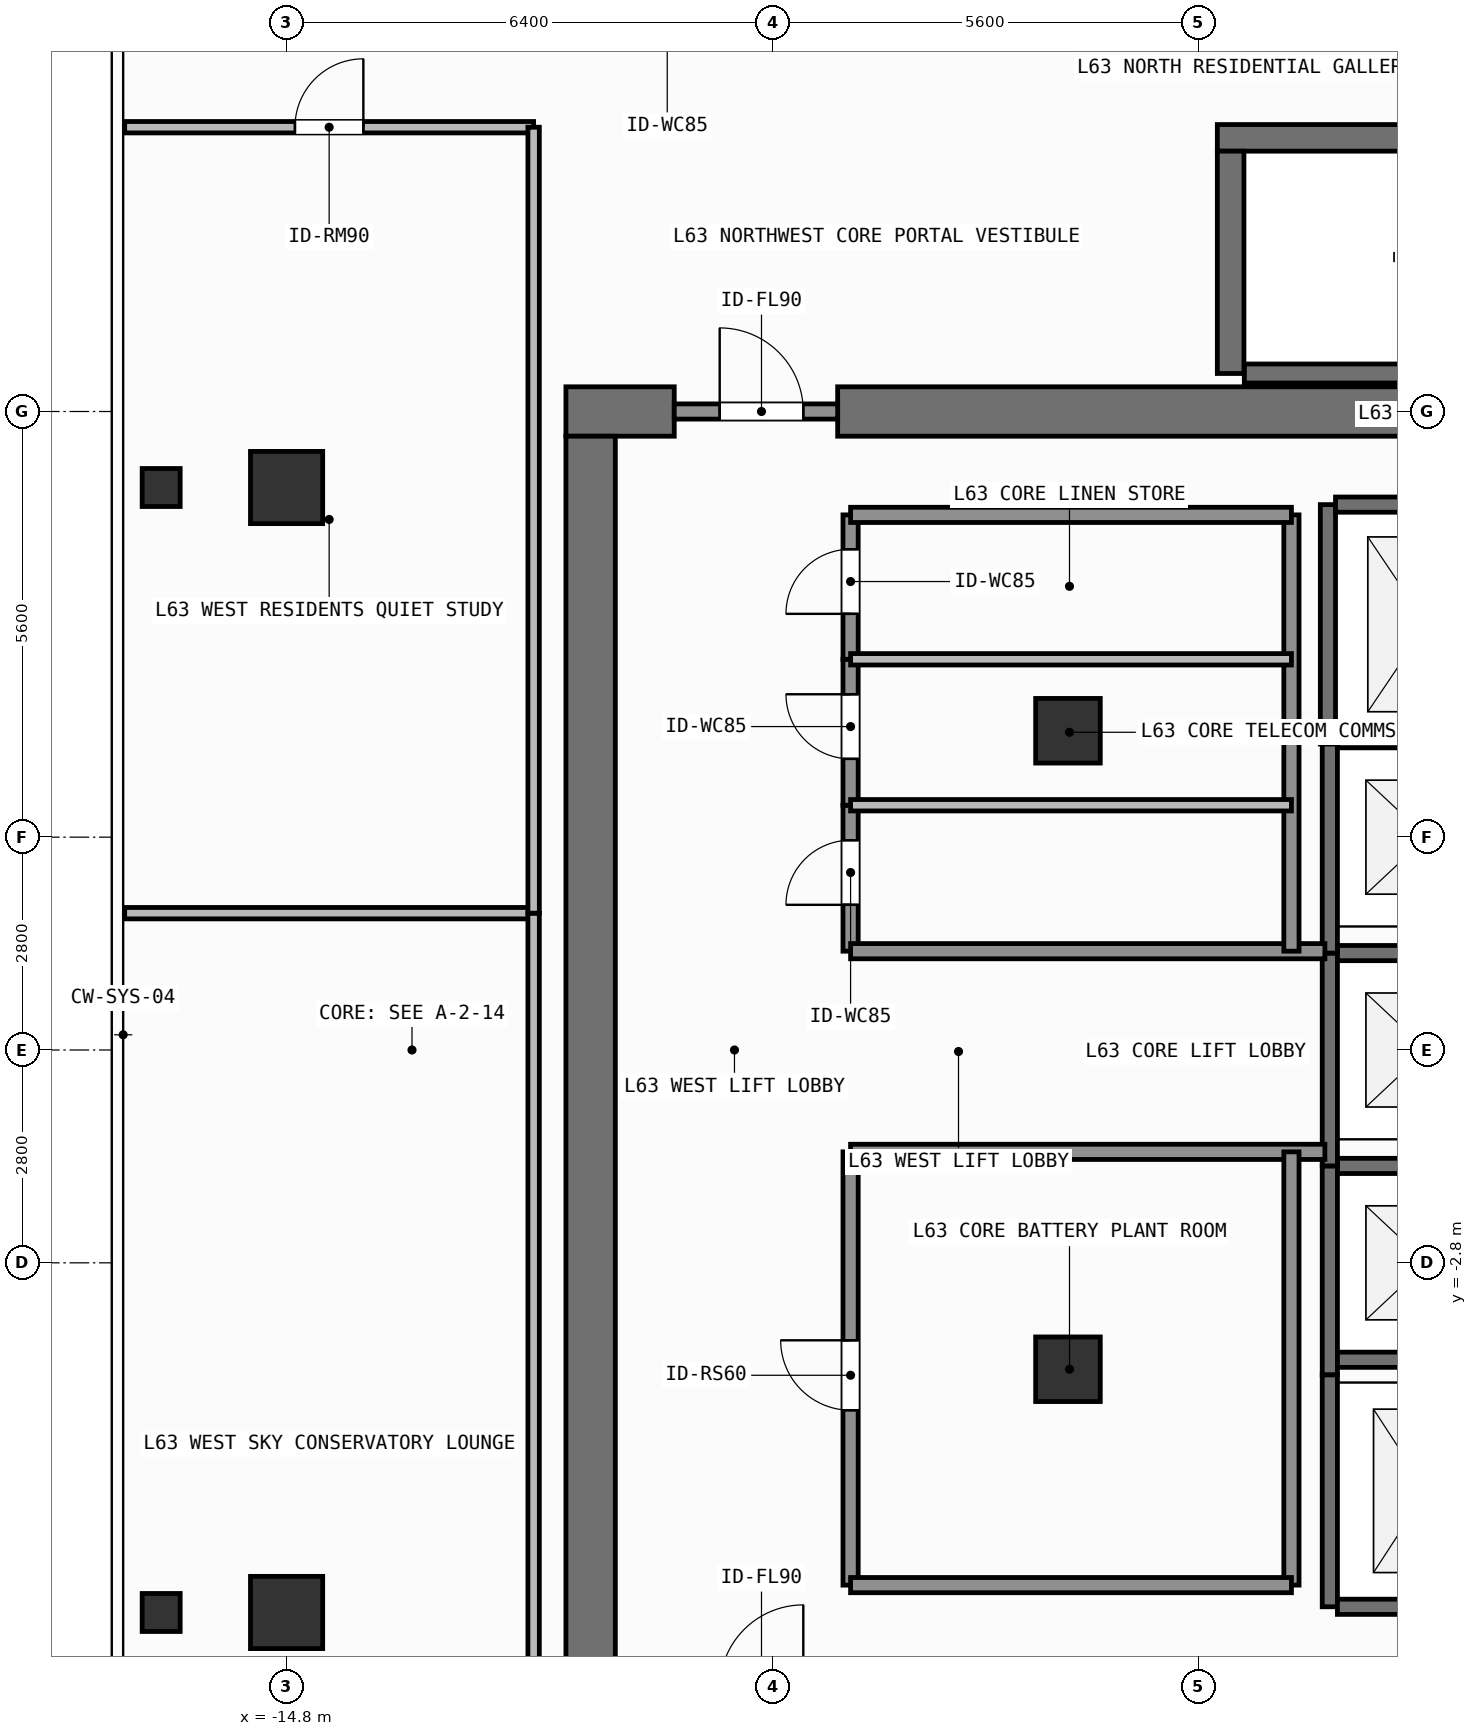
"""IFC4 building model, lengths in metres.
Left out: names, types, materials, properties, quantities, classifications, styles, units other than length and angle.
Written with IfcOpenShell. Run it as: python <this file> out.ifc"""

import sys

from ifc_helpers import new_model, si_unit, direction, frame, frame_2d, origin, origin_2d, place, context, subcontext, project, spatial, rectangle, hollow_rectangle, extrude, element, fill, save


model = new_model("IFC4")
c1 = context("Model", 3, precision=1e-05, world=origin(), true_north=direction((0.0, 1.0)))
c2 = subcontext(c1, "Body", "Model", "MODEL_VIEW")
j1 = project(units=[si_unit("LENGTHUNIT", "METRE"), si_unit("PLANEANGLEUNIT", "RADIAN")], contexts=[c1])
p1 = place(None, origin())
s1 = spatial("IfcSite", under=j1, at=p1, CompositionType="ELEMENT")
p2 = place(p1, origin())
s2 = spatial("IfcBuilding", under=s1, at=p2, CompositionType="ELEMENT")
p3 = place(p2, frame((0.0, 0.0, 258.6)))
s3 = spatial("IfcBuildingStorey", under=s2, at=p3, CompositionType="ELEMENT", Elevation=258.6)
p4 = place(p3, frame((-11.125, 8.4, 0.0), z_axis=(0.0, 0.0, 1.0), x_axis=(1.0, 0.0, 0.0)))
e1 = element("IfcWall", 1, at=p4, inside=s3, PredefinedType="SHEAR", context=c2, shape_type="SweptSolid", body=[
    extrude(rectangle(XDim=1.425, YDim=0.65, at=frame_2d((0.712, 0.0))), origin(), (0.0, 0.0, 1.0), 3.9),
])
p5 = place(p3, frame((-7.55, 8.4, 0.0), z_axis=(0.0, 0.0, 1.0), x_axis=(1.0, 0.0, 0.0)))
e2 = element("IfcWall", 2, at=p5, inside=s3, PredefinedType="SHEAR", context=c2, shape_type="SweptSolid", body=[
    extrude(rectangle(XDim=16.275, YDim=0.65, at=frame_2d((8.138, 0.0))), origin(), (0.0, 0.0, 1.0), 3.9),
])
p6 = place(p3, frame((-10.8, -8.075, 0.0), z_axis=(0.0, 0.0, 1.0), x_axis=(0.0, 1.0, 0.0)))
e3 = element("IfcWall", 3, at=p6, inside=s3, PredefinedType="SHEAR", context=c2, shape_type="SweptSolid", body=[
    extrude(rectangle(XDim=16.15, YDim=0.65, at=frame_2d((8.075, 0.0))), origin(), (0.0, 0.0, 1.0), 3.9),
])
p7 = place(p3, frame((-2.555, 12.0, 0.0), z_axis=(0.0, 0.0, 1.0), x_axis=(1.0, 0.0, 0.0)))
e4 = element("IfcWall", 4, at=p7, inside=s3, PredefinedType="SHEAR", context=c2, shape_type="SweptSolid", body=[
    extrude(rectangle(XDim=7.31, YDim=0.35, at=frame_2d((3.655, 0.0))), origin(), (0.0, 0.0, 1.0), 3.9),
])
p8 = place(p3, frame((-2.2, 8.9, 0.0), z_axis=(0.0, 0.0, 1.0), x_axis=(1.0, 0.0, 0.0)))
e5 = element("IfcWall", 5, at=p8, inside=s3, PredefinedType="SHEAR", context=c2, shape_type="SweptSolid", body=[
    extrude(rectangle(XDim=6.6, YDim=0.25, at=frame_2d((3.3, 0.0))), origin(), (0.0, 0.0, 1.0), 3.9),
])
p9 = place(p3, frame((-2.38, 8.9, 0.0), z_axis=(0.0, 0.0, 1.0), x_axis=(0.0, 1.0, 0.0)))
e6 = element("IfcWall", 6, at=p9, inside=s3, PredefinedType="SHEAR", context=c2, shape_type="SweptSolid", body=[
    extrude(rectangle(XDim=2.925, YDim=0.35, at=frame_2d((1.462, 0.0))), origin(), (0.0, 0.0, 1.0), 3.9),
])
for number, where, z_axis, x_axis in (
    (7, (-14.8, -7.4, 0.0), (0.0, 0.0, 1.0), (1.0, 0.0, 0.0)),
    (8, (-14.8, 7.4, 0.0), (0.0, 0.0, 1.0), (1.0, 0.0, 0.0)),
):
    element("IfcColumn", number, at=place(p3, frame(where, z_axis=z_axis, x_axis=x_axis)), inside=s3, PredefinedType="COLUMN", context=c2, shape_type="SweptSolid", body=[
        extrude(rectangle(XDim=0.95, YDim=0.95, at=origin_2d()), origin(), (0.0, 0.0, 1.0), 3.9),
    ])
for number, where, z_axis, x_axis in (
    (9, (-4.52, -4.2, 0.0), (0.0, 0.0, 1.0), (1.0, 0.0, 0.0)),
    (10, (-4.52, 4.2, 0.0), (0.0, 0.0, 1.0), (1.0, 0.0, 0.0)),
):
    element("IfcColumn", number, at=place(p3, frame(where, z_axis=z_axis, x_axis=x_axis)), inside=s3, PredefinedType="COLUMN", context=c2, shape_type="SweptSolid", body=[
        extrude(rectangle(XDim=0.85, YDim=0.85, at=origin_2d()), origin(), (0.0, 0.0, 1.0), 3.9),
    ])
for number, where, z_axis, x_axis in (
    (11, (-16.45, -7.4, 0.0), (0.0, 0.0, 1.0), (1.0, 0.0, 0.0)),
    (12, (-16.45, 7.4, 0.0), (0.0, 0.0, 1.0), (1.0, 0.0, 0.0)),
):
    element("IfcColumn", number, at=place(p3, frame(where, z_axis=z_axis, x_axis=x_axis)), inside=s3, PredefinedType="COLUMN", context=c2, shape_type="SweptSolid", body=[
        extrude(hollow_rectangle(XDim=0.5, YDim=0.5, WallThickness=0.025, at=origin_2d()), origin(), (0.0, 0.0, 1.0), 3.9),
    ])
p10 = place(p3, frame((-1.075, -4.275, 0.0), z_axis=(0.0, 0.0, 1.0), x_axis=(0.0, 1.0, 0.0)))
e13 = element("IfcWall", 13, at=p10, inside=s3, PredefinedType="SHEAR", context=c2, shape_type="SweptSolid", body=[
    extrude(rectangle(XDim=2.75, YDim=0.2, at=frame_2d((1.375, 0.0))), origin(), (0.0, 0.0, 1.0), 3.68),
])
for number, where, z_axis, x_axis in (
    (14, (-0.975, -4.075, 0.0), (0.0, 0.0, 1.0), (1.0, 0.0, 0.0)),
    (15, (-0.975, -1.525, 0.0), (0.0, 0.0, 1.0), (1.0, 0.0, 0.0)),
):
    element("IfcWall", number, at=place(p3, frame(where, z_axis=z_axis, x_axis=x_axis)), inside=s3, PredefinedType="SHEAR", context=c2, shape_type="SweptSolid", body=[
        extrude(rectangle(XDim=2.35, YDim=0.2, at=frame_2d((1.175, 0.0))), origin(), (0.0, 0.0, 1.0), 3.68),
    ])
p11 = place(p3, frame((-1.075, -1.525, 0.0), z_axis=(0.0, 0.0, 1.0), x_axis=(0.0, 1.0, 0.0)))
e16 = element("IfcWall", 16, at=p11, inside=s3, PredefinedType="SHEAR", context=c2, shape_type="SweptSolid", body=[
    extrude(rectangle(XDim=2.8, YDim=0.2, at=frame_2d((1.4, 0.0))), origin(), (0.0, 0.0, 1.0), 3.68),
])
p12 = place(p3, frame((-0.975, 1.275, 0.0), z_axis=(0.0, 0.0, 1.0), x_axis=(1.0, 0.0, 0.0)))
e17 = element("IfcWall", 17, at=p12, inside=s3, PredefinedType="SHEAR", context=c2, shape_type="SweptSolid", body=[
    extrude(rectangle(XDim=2.35, YDim=0.2, at=frame_2d((1.175, 0.0))), origin(), (0.0, 0.0, 1.0), 3.68),
])
p13 = place(p3, frame((-1.075, 1.275, 0.0), z_axis=(0.0, 0.0, 1.0), x_axis=(0.0, 1.0, 0.0)))
e18 = element("IfcWall", 18, at=p13, inside=s3, PredefinedType="SHEAR", context=c2, shape_type="SweptSolid", body=[
    extrude(rectangle(XDim=2.8, YDim=0.2, at=frame_2d((1.4, 0.0))), origin(), (0.0, 0.0, 1.0), 3.68),
])
p14 = place(p3, frame((-0.975, 4.075, 0.0), z_axis=(0.0, 0.0, 1.0), x_axis=(1.0, 0.0, 0.0)))
e19 = element("IfcWall", 19, at=p14, inside=s3, PredefinedType="SHEAR", context=c2, shape_type="SweptSolid", body=[
    extrude(rectangle(XDim=2.35, YDim=0.2, at=frame_2d((1.175, 0.0))), origin(), (0.0, 0.0, 1.0), 3.68),
])
p15 = place(p3, frame((-1.1, 4.025, 0.0), z_axis=(0.0, 0.0, 1.0), x_axis=(0.0, 1.0, 0.0)))
e20 = element("IfcWall", 20, at=p15, inside=s3, PredefinedType="SHEAR", context=c2, shape_type="SweptSolid", body=[
    extrude(rectangle(XDim=3.15, YDim=0.2, at=frame_2d((1.575, 0.0))), origin(), (0.0, 0.0, 1.0), 3.68),
])
p16 = place(p3, frame((-1.0, 7.175, 0.0), z_axis=(0.0, 0.0, 1.0), x_axis=(1.0, 0.0, 0.0)))
e21 = element("IfcWall", 21, at=p16, inside=s3, PredefinedType="SHEAR", context=c2, shape_type="SweptSolid", body=[
    extrude(rectangle(XDim=2.4, YDim=0.2, at=frame_2d((1.2, 0.0))), origin(), (0.0, 0.0, 1.0), 3.68),
])
p17 = place(p3, frame((-1.075, -7.325, 0.0), z_axis=(0.0, 0.0, 1.0), x_axis=(0.0, 1.0, 0.0)))
e22 = element("IfcWall", 22, at=p17, inside=s3, PredefinedType="SHEAR", context=c2, shape_type="SweptSolid", body=[
    extrude(rectangle(XDim=3.05, YDim=0.2, at=frame_2d((1.525, 0.0))), origin(), (0.0, 0.0, 1.0), 3.68),
])
p18 = place(p3, frame((-0.975, -7.325, 0.0), z_axis=(0.0, 0.0, 1.0), x_axis=(1.0, 0.0, 0.0)))
e23 = element("IfcWall", 23, at=p18, inside=s3, PredefinedType="SHEAR", context=c2, shape_type="SweptSolid", body=[
    extrude(rectangle(XDim=2.35, YDim=0.2, at=frame_2d((1.175, 0.0))), origin(), (0.0, 0.0, 1.0), 3.68),
])
p19 = place(p3, frame((-9.7, 8.4, 0.0), z_axis=(0.0, 0.0, 1.0), x_axis=(1.0, 0.0, 0.0)))
e24 = element("IfcWall", 24, at=p19, inside=s3, PredefinedType="SOLIDWALL", context=c2, shape_type="SweptSolid", body=[
    extrude(rectangle(XDim=2.15, YDim=0.2, at=frame_2d((1.075, 0.0))), origin(), (0.0, 0.0, 1.0), 2.92),
])
p20 = place(p19, frame((0.598, 0.0, 0.0)))
e25 = element("IfcOpeningElement", 25, at=p20, cuts=e24, PredefinedType="OPENING", context=c2, shape_type="SweptSolid", body=[
    extrude(rectangle(XDim=1.1, YDim=2.15, at=frame_2d((0.55, 1.075))), frame((0.0, 0.11, 0.0), z_axis=(0.0, -1.0, 0.0), x_axis=(1.0, 0.0, 0.0)), (0.0, 0.0, 1.0), 0.22),
])
p21 = place(p3, frame((-7.38, -7.04, 0.0), z_axis=(0.0, 0.0, 1.0), x_axis=(0.0, 1.0, 0.0)))
e26 = element("IfcWall", 26, at=p21, inside=s3, PredefinedType="SOLIDWALL", context=c2, shape_type="SweptSolid", body=[
    extrude(rectangle(XDim=5.7, YDim=0.2, at=frame_2d((2.85, 0.0))), origin(), (0.0, 0.0, 1.0), 3.68),
])
p22 = place(p21, frame((2.301, 0.0, 0.0)))
e27 = element("IfcOpeningElement", 27, at=p22, cuts=e26, PredefinedType="OPENING", context=c2, shape_type="SweptSolid", body=[
    extrude(rectangle(XDim=0.92, YDim=2.1, at=frame_2d((0.46, 1.05))), frame((0.0, 0.11, 0.0), z_axis=(0.0, -1.0, 0.0), x_axis=(1.0, 0.0, 0.0)), (0.0, 0.0, 1.0), 0.22),
])
p23 = place(p3, frame((-7.38, 1.3, 0.0), z_axis=(0.0, 0.0, 1.0), x_axis=(0.0, 1.0, 0.0)))
e28 = element("IfcWall", 28, at=p23, inside=s3, PredefinedType="SOLIDWALL", context=c2, shape_type="SweptSolid", body=[
    extrude(rectangle(XDim=1.92, YDim=0.2, at=frame_2d((0.96, 0.0))), origin(), (0.0, 0.0, 1.0), 3.68),
])
p24 = place(p23, frame((0.61, 0.0, 0.0)))
e29 = element("IfcOpeningElement", 29, at=p24, cuts=e28, PredefinedType="OPENING", context=c2, shape_type="SweptSolid", body=[
    extrude(rectangle(XDim=0.85, YDim=2.1, at=frame_2d((0.425, 1.05))), frame((0.0, 0.11, 0.0), z_axis=(0.0, -1.0, 0.0), x_axis=(1.0, 0.0, 0.0)), (0.0, 0.0, 1.0), 0.22),
])
p25 = place(p3, frame((-7.38, 3.22, 0.0), z_axis=(0.0, 0.0, 1.0), x_axis=(0.0, 1.0, 0.0)))
e30 = element("IfcWall", 30, at=p25, inside=s3, PredefinedType="SOLIDWALL", context=c2, shape_type="SweptSolid", body=[
    extrude(rectangle(XDim=1.92, YDim=0.2, at=frame_2d((0.96, 0.0))), origin(), (0.0, 0.0, 1.0), 3.68),
])
p26 = place(p25, frame((0.61, 0.0, 0.0)))
e31 = element("IfcOpeningElement", 31, at=p26, cuts=e30, PredefinedType="OPENING", context=c2, shape_type="SweptSolid", body=[
    extrude(rectangle(XDim=0.85, YDim=2.1, at=frame_2d((0.425, 1.05))), frame((0.0, 0.11, 0.0), z_axis=(0.0, -1.0, 0.0), x_axis=(1.0, 0.0, 0.0)), (0.0, 0.0, 1.0), 0.22),
])
p27 = place(p3, frame((-7.38, 5.14, 0.0), z_axis=(0.0, 0.0, 1.0), x_axis=(0.0, 1.0, 0.0)))
e32 = element("IfcWall", 32, at=p27, inside=s3, PredefinedType="SOLIDWALL", context=c2, shape_type="SweptSolid", body=[
    extrude(rectangle(XDim=1.9, YDim=0.2, at=frame_2d((0.95, 0.0))), origin(), (0.0, 0.0, 1.0), 3.68),
])
p28 = place(p27, frame((0.598, 0.0, 0.0)))
e33 = element("IfcOpeningElement", 33, at=p28, cuts=e32, PredefinedType="OPENING", context=c2, shape_type="SweptSolid", body=[
    extrude(rectangle(XDim=0.85, YDim=2.1, at=frame_2d((0.425, 1.05))), frame((0.0, 0.11, 0.0), z_axis=(0.0, -1.0, 0.0), x_axis=(1.0, 0.0, 0.0)), (0.0, 0.0, 1.0), 0.22),
])
p29 = place(p3, frame((-16.93, 12.14, 0.0), z_axis=(0.0, 0.0, 1.0), x_axis=(1.0, 0.0, 0.0)))
e34 = element("IfcWall", 34, at=p29, inside=s3, PredefinedType="PARTITIONING", context=c2, shape_type="SweptSolid", body=[
    extrude(rectangle(XDim=5.38, YDim=0.15, at=frame_2d((2.69, 0.0))), origin(), (0.0, 0.0, 1.0), 3.68),
])
p30 = place(p29, frame((2.24, 0.0, 0.0)))
e35 = element("IfcOpeningElement", 35, at=p30, cuts=e34, PredefinedType="OPENING", context=c2, shape_type="SweptSolid", body=[
    extrude(rectangle(XDim=0.9, YDim=2.1, at=frame_2d((0.45, 1.05))), frame((0.0, 0.085, 0.0), z_axis=(0.0, -1.0, 0.0), x_axis=(1.0, 0.0, 0.0)), (0.0, 0.0, 1.0), 0.17),
])
for number, where, z_axis, x_axis in (
    (36, (-7.38, -1.34, 0.0), (0.0, 0.0, 1.0), (1.0, 0.0, 0.0)),
    (37, (-7.38, 1.3, 0.0), (0.0, 0.0, 1.0), (1.0, 0.0, 0.0)),
):
    element("IfcWall", number, at=place(p3, frame(where, z_axis=z_axis, x_axis=x_axis)), inside=s3, PredefinedType="SOLIDWALL", context=c2, shape_type="SweptSolid", body=[
        extrude(rectangle(XDim=6.24, YDim=0.2, at=frame_2d((3.12, 0.0))), origin(), (0.0, 0.0, 1.0), 3.68),
    ])
p31 = place(p3, frame((-1.58, -7.04, 0.0), z_axis=(0.0, 0.0, 1.0), x_axis=(0.0, 1.0, 0.0)))
e38 = element("IfcWall", 38, at=p31, inside=s3, PredefinedType="SOLIDWALL", context=c2, shape_type="SweptSolid", body=[
    extrude(rectangle(XDim=5.7, YDim=0.2, at=frame_2d((2.85, 0.0))), origin(), (0.0, 0.0, 1.0), 3.68),
])
p32 = place(p3, frame((-7.38, -7.04, 0.0), z_axis=(0.0, 0.0, 1.0), x_axis=(1.0, 0.0, 0.0)))
e39 = element("IfcWall", 39, at=p32, inside=s3, PredefinedType="SOLIDWALL", context=c2, shape_type="SweptSolid", body=[
    extrude(rectangle(XDim=5.8, YDim=0.2, at=frame_2d((2.9, 0.0))), origin(), (0.0, 0.0, 1.0), 3.68),
])
p33 = place(p3, frame((-1.58, 1.3, 0.0), z_axis=(0.0, 0.0, 1.0), x_axis=(0.0, 1.0, 0.0)))
e40 = element("IfcWall", 40, at=p33, inside=s3, PredefinedType="SOLIDWALL", context=c2, shape_type="SweptSolid", body=[
    extrude(rectangle(XDim=5.74, YDim=0.2, at=frame_2d((2.87, 0.0))), origin(), (0.0, 0.0, 1.0), 3.68),
])
p34 = place(p3, frame((-7.38, 7.04, 0.0), z_axis=(0.0, 0.0, 1.0), x_axis=(1.0, 0.0, 0.0)))
e41 = element("IfcWall", 41, at=p34, inside=s3, PredefinedType="SOLIDWALL", context=c2, shape_type="SweptSolid", body=[
    extrude(rectangle(XDim=5.8, YDim=0.2, at=frame_2d((2.9, 0.0))), origin(), (0.0, 0.0, 1.0), 3.68),
])
for number, where, z_axis, x_axis in (
    (42, (-7.38, 3.22, 0.0), (0.0, 0.0, 1.0), (1.0, 0.0, 0.0)),
    (43, (-7.38, 5.14, 0.0), (0.0, 0.0, 1.0), (1.0, 0.0, 0.0)),
):
    element("IfcWall", number, at=place(p3, frame(where, z_axis=z_axis, x_axis=x_axis)), inside=s3, PredefinedType="PARTITIONING", context=c2, shape_type="SweptSolid", body=[
        extrude(rectangle(XDim=5.8, YDim=0.15, at=frame_2d((2.9, 0.0))), origin(), (0.0, 0.0, 1.0), 3.68),
    ])
p35 = place(p3, frame((-16.93, 1.8, 0.0), z_axis=(0.0, 0.0, 1.0), x_axis=(1.0, 0.0, 0.0)))
e44 = element("IfcWall", 44, at=p35, inside=s3, PredefinedType="PARTITIONING", context=c2, shape_type="SweptSolid", body=[
    extrude(rectangle(XDim=5.38, YDim=0.15, at=frame_2d((2.69, 0.0))), origin(), (0.0, 0.0, 1.0), 3.68),
])
p36 = place(p3, frame((-11.55, -12.14, 0.0), z_axis=(0.0, 0.0, 1.0), x_axis=(0.0, 1.0, 0.0)))
e45 = element("IfcWall", 45, at=p36, inside=s3, PredefinedType="PARTITIONING", context=c2, shape_type="SweptSolid", body=[
    extrude(rectangle(XDim=13.94, YDim=0.15, at=frame_2d((6.97, 0.0))), origin(), (0.0, 0.0, 1.0), 3.68),
])
p37 = place(p3, frame((-11.55, 1.8, 0.0), z_axis=(0.0, 0.0, 1.0), x_axis=(0.0, 1.0, 0.0)))
e46 = element("IfcWall", 46, at=p37, inside=s3, PredefinedType="PARTITIONING", context=c2, shape_type="SweptSolid", body=[
    extrude(rectangle(XDim=10.34, YDim=0.15, at=frame_2d((5.17, 0.0))), origin(), (0.0, 0.0, 1.0), 3.68),
])
p38 = place(p20, origin())
e47 = element("IfcDoor", 47, at=p38, inside=s3, OperationType="SINGLE_SWING_LEFT", PredefinedType="DOOR", context=c2, shape_type="SweptSolid", body=[
    extrude(rectangle(XDim=1.1, YDim=2.15, at=frame_2d((0.55, 1.075))), frame((0.0, 0.025, 0.0), z_axis=(0.0, -1.0, 0.0), x_axis=(1.0, 0.0, 0.0)), (0.0, 0.0, 1.0), 0.05),
])
fill(e25, e47)
p39 = place(p22, origin())
e48 = element("IfcDoor", 48, at=p39, inside=s3, OperationType="SINGLE_SWING_RIGHT", PredefinedType="DOOR", context=c2, shape_type="SweptSolid", body=[
    extrude(rectangle(XDim=0.92, YDim=2.1, at=frame_2d((0.46, 1.05))), frame((0.0, 0.025, 0.0), z_axis=(0.0, -1.0, 0.0), x_axis=(1.0, 0.0, 0.0)), (0.0, 0.0, 1.0), 0.05),
])
fill(e27, e48)
p40 = place(p24, origin())
e49 = element("IfcDoor", 49, at=p40, inside=s3, OperationType="SINGLE_SWING_LEFT", PredefinedType="DOOR", context=c2, shape_type="SweptSolid", body=[
    extrude(rectangle(XDim=0.85, YDim=2.1, at=frame_2d((0.425, 1.05))), frame((0.0, 0.025, 0.0), z_axis=(0.0, -1.0, 0.0), x_axis=(1.0, 0.0, 0.0)), (0.0, 0.0, 1.0), 0.05),
])
fill(e29, e49)
p41 = place(p26, origin())
e50 = element("IfcDoor", 50, at=p41, inside=s3, OperationType="SINGLE_SWING_RIGHT", PredefinedType="DOOR", context=c2, shape_type="SweptSolid", body=[
    extrude(rectangle(XDim=0.85, YDim=2.1, at=frame_2d((0.425, 1.05))), frame((0.0, 0.025, 0.0), z_axis=(0.0, -1.0, 0.0), x_axis=(1.0, 0.0, 0.0)), (0.0, 0.0, 1.0), 0.05),
])
fill(e31, e50)
p42 = place(p28, origin())
e51 = element("IfcDoor", 51, at=p42, inside=s3, OperationType="SINGLE_SWING_LEFT", PredefinedType="DOOR", context=c2, shape_type="SweptSolid", body=[
    extrude(rectangle(XDim=0.85, YDim=2.1, at=frame_2d((0.425, 1.05))), frame((0.0, 0.025, 0.0), z_axis=(0.0, -1.0, 0.0), x_axis=(1.0, 0.0, 0.0)), (0.0, 0.0, 1.0), 0.05),
])
fill(e33, e51)
p43 = place(p30, origin())
e52 = element("IfcDoor", 52, at=p43, inside=s3, OperationType="SINGLE_SWING_RIGHT", PredefinedType="DOOR", context=c2, shape_type="SweptSolid", body=[
    extrude(rectangle(XDim=0.9, YDim=2.1, at=frame_2d((0.45, 1.05))), frame((0.0, 0.025, 0.0), z_axis=(0.0, -1.0, 0.0), x_axis=(1.0, 0.0, 0.0)), (0.0, 0.0, 1.0), 0.05),
])
fill(e35, e52)
save(model, sys.argv[1])
